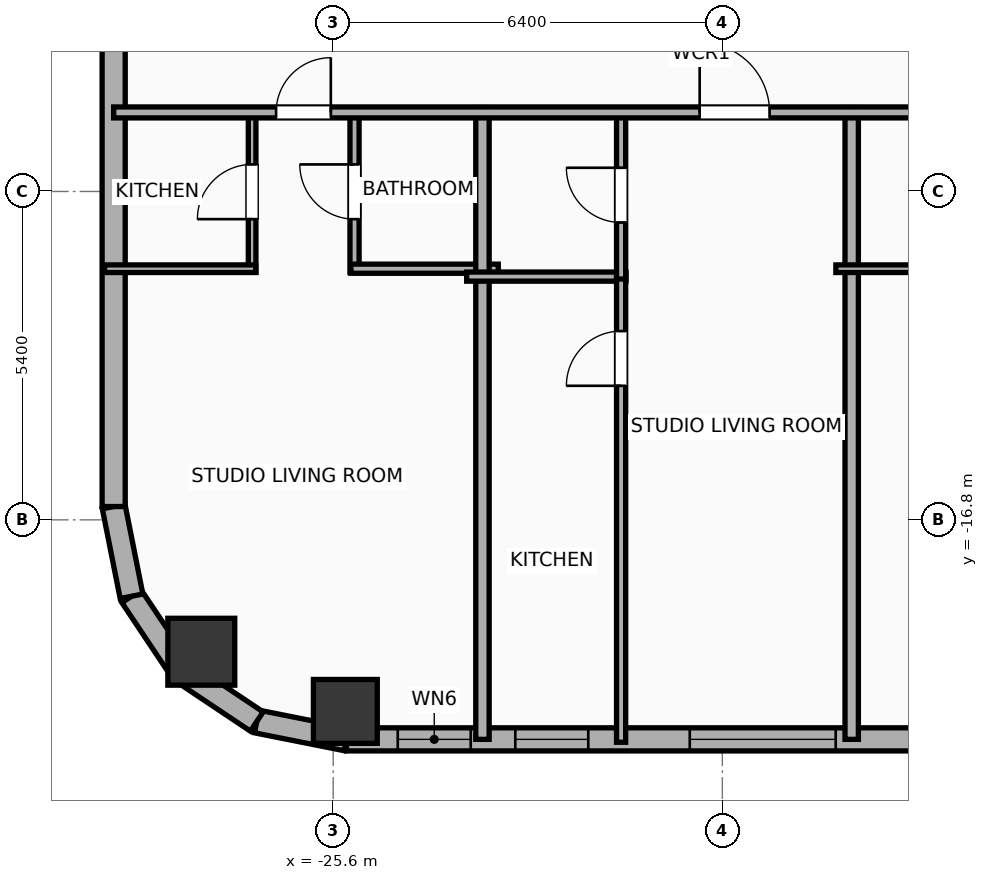
"""IFC4 building model, lengths in metres.
Left out: names, types, materials, properties, quantities, classifications, styles, units other than length and angle.
Written with IfcOpenShell. Run it as: python <this file> out.ifc"""

import sys

from ifc_helpers import new_model, si_unit, direction, frame, frame_2d, origin, origin_2d, place, context, subcontext, project, spatial, rectangle, hollow_rectangle, hollow_circle, extrude, element, fill, save


model = new_model("IFC4")
c1 = context("Model", 3, precision=1e-05, world=origin(), true_north=direction((0.0, 1.0)))
c2 = subcontext(c1, "Body", "Model", "MODEL_VIEW")
j1 = project(units=[si_unit("LENGTHUNIT", "METRE"), si_unit("PLANEANGLEUNIT", "RADIAN")], contexts=[c1])
p1 = place(None, origin())
s1 = spatial("IfcSite", under=j1, at=p1, CompositionType="ELEMENT")
p2 = place(p1, origin())
s2 = spatial("IfcBuilding", under=s1, at=p2, CompositionType="ELEMENT")
p3 = place(p2, frame((0.0, 0.0, 124.8)))
s3 = spatial("IfcBuildingStorey", under=s2, at=p3, CompositionType="ELEMENT", Elevation=124.8)
p4 = place(p3, frame((-25.4, -19.95, 0.0), z_axis=(0.0, 0.0, 1.0), x_axis=(1.0, 0.0, 0.0)))
e1 = element("IfcColumn", 1, at=p4, inside=s3, PredefinedType="COLUMN", context=c2, shape_type="SweptSolid", body=[
    extrude(hollow_rectangle(XDim=1.05, YDim=1.05, WallThickness=0.036, at=origin_2d()), origin(), (0.0, 0.0, 1.0), 3.9),
])
p5 = place(p3, frame((-27.769, -18.969, 0.0), z_axis=(0.0, 0.0, 1.0), x_axis=(1.0, 0.0, 0.0)))
e2 = element("IfcColumn", 2, at=p5, inside=s3, PredefinedType="COLUMN", context=c2, shape_type="SweptSolid", body=[
    extrude(hollow_circle(Radius=0.55, WallThickness=0.036, at=origin_2d()), origin(), (0.0, 0.0, 1.0), 3.9),
])
p6 = place(p3, frame((29.381, -20.41, 0.0), z_axis=(0.0, 0.0, 1.0), x_axis=(-1.0, 0.0, 0.0)))
e3 = element("IfcWall", 3, at=p6, inside=s3, PredefinedType="ELEMENTEDWALL", context=c2, shape_type="SweptSolid", body=[
    extrude(rectangle(XDim=54.763, YDim=0.38, at=frame_2d((27.381, 0.0))), origin(), (0.0, 0.0, 1.0), 3.65),
])
p7 = place(p6, frame((5.645, 0.0, 0.75)))
e4 = element("IfcOpeningElement", 4, at=p7, cuts=e3, PredefinedType="OPENING", context=c2, shape_type="SweptSolid", body=[
    extrude(rectangle(XDim=2.4, YDim=2.1, at=frame_2d((1.2, 1.05))), frame((0.0, 0.2, 0.0), z_axis=(0.0, -1.0, 0.0), x_axis=(1.0, 0.0, 0.0)), (0.0, 0.0, 1.0), 0.4),
])
p8 = place(p6, frame((18.486, 0.0, 0.75)))
e5 = element("IfcOpeningElement", 5, at=p8, cuts=e3, PredefinedType="OPENING", context=c2, shape_type="SweptSolid", body=[
    extrude(rectangle(XDim=2.4, YDim=2.1, at=frame_2d((1.2, 1.05))), frame((0.0, 0.2, 0.0), z_axis=(0.0, -1.0, 0.0), x_axis=(1.0, 0.0, 0.0)), (0.0, 0.0, 1.0), 0.4),
])
p9 = place(p6, frame((34.677, 0.0, 0.75)))
e6 = element("IfcOpeningElement", 6, at=p9, cuts=e3, PredefinedType="OPENING", context=c2, shape_type="SweptSolid", body=[
    extrude(rectangle(XDim=2.4, YDim=2.1, at=frame_2d((1.2, 1.05))), frame((0.0, 0.2, 0.0), z_axis=(0.0, -1.0, 0.0), x_axis=(1.0, 0.0, 0.0)), (0.0, 0.0, 1.0), 0.4),
])
p10 = place(p6, frame((46.717, 0.0, 0.75)))
e7 = element("IfcOpeningElement", 7, at=p10, cuts=e3, PredefinedType="OPENING", context=c2, shape_type="SweptSolid", body=[
    extrude(rectangle(XDim=2.4, YDim=2.1, at=frame_2d((1.2, 1.05))), frame((0.0, 0.2, 0.0), z_axis=(0.0, -1.0, 0.0), x_axis=(1.0, 0.0, 0.0)), (0.0, 0.0, 1.0), 0.4),
])
p11 = place(p6, frame((52.719, 0.0, 0.75)))
e8 = element("IfcOpeningElement", 8, at=p11, cuts=e3, PredefinedType="OPENING", context=c2, shape_type="SweptSolid", body=[
    extrude(rectangle(XDim=1.2, YDim=2.05, at=frame_2d((0.6, 1.025))), frame((0.0, 0.2, 0.0), z_axis=(0.0, -1.0, 0.0), x_axis=(1.0, 0.0, 0.0)), (0.0, 0.0, 1.0), 0.4),
])
p12 = place(p6, frame((50.786, 0.0, 0.75)))
e9 = element("IfcOpeningElement", 9, at=p12, cuts=e3, PredefinedType="OPENING", context=c2, shape_type="SweptSolid", body=[
    extrude(rectangle(XDim=1.2, YDim=2.05, at=frame_2d((0.6, 1.025))), frame((0.0, 0.2, 0.0), z_axis=(0.0, -1.0, 0.0), x_axis=(1.0, 0.0, 0.0)), (0.0, 0.0, 1.0), 0.4),
])
p13 = place(p6, frame((41.858, 0.0, 0.75)))
e10 = element("IfcOpeningElement", 10, at=p13, cuts=e3, PredefinedType="OPENING", context=c2, shape_type="SweptSolid", body=[
    extrude(rectangle(XDim=1.2, YDim=2.05, at=frame_2d((0.6, 1.025))), frame((0.0, 0.2, 0.0), z_axis=(0.0, -1.0, 0.0), x_axis=(1.0, 0.0, 0.0)), (0.0, 0.0, 1.0), 0.4),
])
p14 = place(p6, frame((38.556, 0.0, 0.75)))
e11 = element("IfcOpeningElement", 11, at=p14, cuts=e3, PredefinedType="OPENING", context=c2, shape_type="SweptSolid", body=[
    extrude(rectangle(XDim=1.2, YDim=2.05, at=frame_2d((0.6, 1.025))), frame((0.0, 0.2, 0.0), z_axis=(0.0, -1.0, 0.0), x_axis=(1.0, 0.0, 0.0)), (0.0, 0.0, 1.0), 0.4),
])
p15 = place(p6, frame((30.406, 0.0, 0.75)))
e12 = element("IfcOpeningElement", 12, at=p15, cuts=e3, PredefinedType="OPENING", context=c2, shape_type="SweptSolid", body=[
    extrude(rectangle(XDim=1.2, YDim=2.05, at=frame_2d((0.6, 1.025))), frame((0.0, 0.2, 0.0), z_axis=(0.0, -1.0, 0.0), x_axis=(1.0, 0.0, 0.0)), (0.0, 0.0, 1.0), 0.4),
])
p16 = place(p6, frame((25.434, 0.0, 0.75)))
e13 = element("IfcOpeningElement", 13, at=p16, cuts=e3, PredefinedType="OPENING", context=c2, shape_type="SweptSolid", body=[
    extrude(rectangle(XDim=1.2, YDim=2.05, at=frame_2d((0.6, 1.025))), frame((0.0, 0.2, 0.0), z_axis=(0.0, -1.0, 0.0), x_axis=(1.0, 0.0, 0.0)), (0.0, 0.0, 1.0), 0.4),
])
p17 = place(p6, frame((22.669, 0.0, 0.75)))
e14 = element("IfcOpeningElement", 14, at=p17, cuts=e3, PredefinedType="OPENING", context=c2, shape_type="SweptSolid", body=[
    extrude(rectangle(XDim=1.2, YDim=2.05, at=frame_2d((0.6, 1.025))), frame((0.0, 0.2, 0.0), z_axis=(0.0, -1.0, 0.0), x_axis=(1.0, 0.0, 0.0)), (0.0, 0.0, 1.0), 0.4),
])
p18 = place(p6, frame((15.954, 0.0, 0.75)))
e15 = element("IfcOpeningElement", 15, at=p18, cuts=e3, PredefinedType="OPENING", context=c2, shape_type="SweptSolid", body=[
    extrude(rectangle(XDim=1.2, YDim=2.05, at=frame_2d((0.6, 1.025))), frame((0.0, 0.2, 0.0), z_axis=(0.0, -1.0, 0.0), x_axis=(1.0, 0.0, 0.0)), (0.0, 0.0, 1.0), 0.4),
])
p19 = place(p6, frame((11.698, 0.0, 0.75)))
e16 = element("IfcOpeningElement", 16, at=p19, cuts=e3, PredefinedType="OPENING", context=c2, shape_type="SweptSolid", body=[
    extrude(rectangle(XDim=1.2, YDim=2.05, at=frame_2d((0.6, 1.025))), frame((0.0, 0.2, 0.0), z_axis=(0.0, -1.0, 0.0), x_axis=(1.0, 0.0, 0.0)), (0.0, 0.0, 1.0), 0.4),
])
p20 = place(p6, frame((3.225, 0.0, 0.75)))
e17 = element("IfcOpeningElement", 17, at=p20, cuts=e3, PredefinedType="OPENING", context=c2, shape_type="SweptSolid", body=[
    extrude(rectangle(XDim=1.2, YDim=2.05, at=frame_2d((0.6, 1.025))), frame((0.0, 0.2, 0.0), z_axis=(0.0, -1.0, 0.0), x_axis=(1.0, 0.0, 0.0)), (0.0, 0.0, 1.0), 0.4),
])
p21 = place(p6, frame((1.13, 0.0, 0.75)))
e18 = element("IfcOpeningElement", 18, at=p21, cuts=e3, PredefinedType="OPENING", context=c2, shape_type="SweptSolid", body=[
    extrude(rectangle(XDim=1.2, YDim=2.05, at=frame_2d((0.6, 1.025))), frame((0.0, 0.2, 0.0), z_axis=(0.0, -1.0, 0.0), x_axis=(1.0, 0.0, 0.0)), (0.0, 0.0, 1.0), 0.4),
])
p22 = place(p3, frame((-25.381, -20.41, 0.0), z_axis=(0.0, 0.0, 1.0), x_axis=(-0.980786132421, 0.195086038585, 0.0)))
e19 = element("IfcWall", 19, at=p22, inside=s3, PredefinedType="ELEMENTEDWALL", context=c2, shape_type="SweptSolid", body=[
    extrude(rectangle(XDim=1.504, YDim=0.38, at=frame_2d((0.752, 0.0))), origin(), (0.0, 0.0, 1.0), 3.65),
])
p23 = place(p3, frame((-26.857, -20.116, 0.0), z_axis=(0.0, 0.0, 1.0), x_axis=(-0.831468045563, 0.555572577804, 0.0)))
e20 = element("IfcWall", 20, at=p23, inside=s3, PredefinedType="ELEMENTEDWALL", context=c2, shape_type="SweptSolid", body=[
    extrude(rectangle(XDim=1.485, YDim=0.38, at=frame_2d((0.742, 0.0))), origin(), (0.0, 0.0, 1.0), 3.65),
])
p24 = place(p3, frame((-28.091, -19.292, 0.0), z_axis=(0.0, 0.0, 1.0), x_axis=(-0.555610286119, 0.831442848281, 0.0)))
e21 = element("IfcWall", 21, at=p24, inside=s3, PredefinedType="ELEMENTEDWALL", context=c2, shape_type="SweptSolid", body=[
    extrude(rectangle(XDim=1.485, YDim=0.38, at=frame_2d((0.743, 0.0))), origin(), (0.0, 0.0, 1.0), 3.65),
])
p25 = place(p3, frame((-28.917, -18.057, 0.0), z_axis=(0.0, 0.0, 1.0), x_axis=(-0.195086038585, 0.980786132421, 0.0)))
e22 = element("IfcWall", 22, at=p25, inside=s3, PredefinedType="ELEMENTEDWALL", context=c2, shape_type="SweptSolid", body=[
    extrude(rectangle(XDim=1.504, YDim=0.38, at=frame_2d((0.752, 0.0))), origin(), (0.0, 0.0, 1.0), 3.65),
])
p26 = place(p3, frame((-29.21, -16.581, 0.0), z_axis=(0.0, 0.0, 1.0), x_axis=(0.0, 1.0, 0.0)))
e23 = element("IfcWall", 23, at=p26, inside=s3, PredefinedType="ELEMENTEDWALL", context=c2, shape_type="SweptSolid", body=[
    extrude(rectangle(XDim=34.363, YDim=0.38, at=frame_2d((17.181, 0.0))), origin(), (0.0, 0.0, 1.0), 3.65),
])
p27 = place(p26, frame((30.757, 0.0, 0.75)))
e24 = element("IfcOpeningElement", 24, at=p27, cuts=e23, PredefinedType="OPENING", context=c2, shape_type="SweptSolid", body=[
    extrude(rectangle(XDim=1.2, YDim=2.05, at=frame_2d((0.6, 1.025))), frame((0.0, 0.2, 0.0), z_axis=(0.0, -1.0, 0.0), x_axis=(1.0, 0.0, 0.0)), (0.0, 0.0, 1.0), 0.4),
])
p28 = place(p26, frame((20.326, 0.0, 0.75)))
e25 = element("IfcOpeningElement", 25, at=p28, cuts=e23, PredefinedType="OPENING", context=c2, shape_type="SweptSolid", body=[
    extrude(rectangle(XDim=1.2, YDim=2.05, at=frame_2d((0.6, 1.025))), frame((0.0, 0.2, 0.0), z_axis=(0.0, -1.0, 0.0), x_axis=(1.0, 0.0, 0.0)), (0.0, 0.0, 1.0), 0.4),
])
p29 = place(p26, frame((11.776, 0.0, 0.75)))
e26 = element("IfcOpeningElement", 26, at=p29, cuts=e23, PredefinedType="OPENING", context=c2, shape_type="SweptSolid", body=[
    extrude(rectangle(XDim=1.2, YDim=2.05, at=frame_2d((0.6, 1.025))), frame((0.0, 0.2, 0.0), z_axis=(0.0, -1.0, 0.0), x_axis=(1.0, 0.0, 0.0)), (0.0, 0.0, 1.0), 0.4),
])
p30 = place(p3, frame((-26.933, -12.73, 0.0), z_axis=(0.0, 0.0, 1.0), x_axis=(0.0, 1.0, 0.0)))
e27 = element("IfcWall", 27, at=p30, inside=s3, PredefinedType="PARTITIONING", context=c2, shape_type="SweptSolid", body=[
    extrude(rectangle(XDim=2.65, YDim=0.125, at=frame_2d((1.325, 0.0))), origin(), (0.0, 0.0, 1.0), 3.65),
])
p31 = place(p30, frame((0.875, 0.0, 0.0)))
e28 = element("IfcOpeningElement", 28, at=p31, cuts=e27, PredefinedType="OPENING", context=c2, shape_type="SweptSolid", body=[
    extrude(rectangle(XDim=0.9, YDim=2.05, at=frame_2d((0.45, 1.025))), frame((0.0, 0.073, 0.0), z_axis=(0.0, -1.0, 0.0), x_axis=(1.0, 0.0, 0.0)), (0.0, 0.0, 1.0), 0.145),
])
p32 = place(p3, frame((-25.249, -12.73, 0.0), z_axis=(0.0, 0.0, 1.0), x_axis=(0.0, 1.0, 0.0)))
e29 = element("IfcWall", 29, at=p32, inside=s3, PredefinedType="PLUMBINGWALL", context=c2, shape_type="SweptSolid", body=[
    extrude(rectangle(XDim=2.65, YDim=0.15, at=frame_2d((1.325, 0.0))), origin(), (0.0, 0.0, 1.0), 3.65),
])
p33 = place(p32, frame((0.875, 0.0, 0.0)))
e30 = element("IfcOpeningElement", 30, at=p33, cuts=e29, PredefinedType="OPENING", context=c2, shape_type="SweptSolid", body=[
    extrude(rectangle(XDim=0.9, YDim=2.05, at=frame_2d((0.45, 1.025))), frame((0.0, 0.085, 0.0), z_axis=(0.0, -1.0, 0.0), x_axis=(1.0, 0.0, 0.0)), (0.0, 0.0, 1.0), 0.17),
])
p34 = place(p3, frame((-29.36, -12.67, 0.0), z_axis=(0.0, 0.0, 1.0), x_axis=(1.0, 0.0, 0.0)))
e31 = element("IfcWall", 31, at=p34, inside=s3, PredefinedType="PARTITIONING", context=c2, shape_type="SweptSolid", body=[
    extrude(rectangle(XDim=2.487, YDim=0.125, at=frame_2d((1.244, 0.0))), origin(), (0.0, 0.0, 1.0), 3.65),
])
p35 = place(p3, frame((-25.309, -12.67, 0.0), z_axis=(0.0, 0.0, 1.0), x_axis=(1.0, 0.0, 0.0)))
e32 = element("IfcWall", 32, at=p35, inside=s3, PredefinedType="PLUMBINGWALL", context=c2, shape_type="SweptSolid", body=[
    extrude(rectangle(XDim=2.424, YDim=0.15, at=frame_2d((1.212, 0.0))), origin(), (0.0, 0.0, 1.0), 3.65),
])
p36 = place(p3, frame((-23.145, -20.41, 0.0), z_axis=(0.0, 0.0, 1.0), x_axis=(0.0, 1.0, 0.0)))
e33 = element("IfcWall", 33, at=p36, inside=s3, PredefinedType="PARTITIONING", context=c2, shape_type="SweptSolid", body=[
    extrude(rectangle(XDim=10.39, YDim=0.22, at=frame_2d((5.195, 0.0))), origin(), (0.0, 0.0, 1.0), 3.65),
])
p37 = place(p3, frame((-23.405, -12.8, 0.0), z_axis=(0.0, 0.0, 1.0), x_axis=(1.0, 0.0, 0.0)))
e34 = element("IfcWall", 34, at=p37, inside=s3, PredefinedType="PLUMBINGWALL", context=c2, shape_type="SweptSolid", body=[
    extrude(rectangle(XDim=2.62, YDim=0.15, at=frame_2d((1.31, 0.0))), origin(), (0.0, 0.0, 1.0), 3.65),
])
p38 = place(p3, frame((-20.865, -20.458, 0.0), z_axis=(0.0, 0.0, 1.0), x_axis=(0.0, 1.0, 0.0)))
e35 = element("IfcWall", 35, at=p38, inside=s3, PredefinedType="PLUMBINGWALL", context=c2, shape_type="SweptSolid", body=[
    extrude(rectangle(XDim=7.698, YDim=0.15, at=frame_2d((3.849, 0.0))), origin(), (0.0, 0.0, 1.0), 3.65),
])
p39 = place(p38, frame((5.862, 0.0, 0.0)))
e36 = element("IfcOpeningElement", 36, at=p39, cuts=e35, PredefinedType="OPENING", context=c2, shape_type="SweptSolid", body=[
    extrude(rectangle(XDim=0.9, YDim=2.05, at=frame_2d((0.45, 1.025))), frame((0.0, 0.085, 0.0), z_axis=(0.0, -1.0, 0.0), x_axis=(1.0, 0.0, 0.0)), (0.0, 0.0, 1.0), 0.17),
])
p40 = place(p3, frame((-20.865, -12.84, 0.0), z_axis=(0.0, 0.0, 1.0), x_axis=(0.0, 1.0, 0.0)))
e37 = element("IfcWall", 37, at=p40, inside=s3, PredefinedType="PLUMBINGWALL", context=c2, shape_type="SweptSolid", body=[
    extrude(rectangle(XDim=2.76, YDim=0.15, at=frame_2d((1.38, 0.0))), origin(), (0.0, 0.0, 1.0), 3.65),
])
p41 = place(p40, frame((0.93, 0.0, 0.0)))
e38 = element("IfcOpeningElement", 38, at=p41, cuts=e37, PredefinedType="OPENING", context=c2, shape_type="SweptSolid", body=[
    extrude(rectangle(XDim=0.9, YDim=2.05, at=frame_2d((0.45, 1.025))), frame((0.0, 0.085, 0.0), z_axis=(0.0, -1.0, 0.0), x_axis=(1.0, 0.0, 0.0)), (0.0, 0.0, 1.0), 0.17),
])
p42 = place(p3, frame((-17.073, -20.41, 0.0), z_axis=(0.0, 0.0, 1.0), x_axis=(0.0, 1.0, 0.0)))
e39 = element("IfcWall", 39, at=p42, inside=s3, PredefinedType="PARTITIONING", context=c2, shape_type="SweptSolid", body=[
    extrude(rectangle(XDim=10.39, YDim=0.22, at=frame_2d((5.195, 0.0))), origin(), (0.0, 0.0, 1.0), 3.65),
])
p43 = place(p3, frame((-17.333, -12.67, 0.0), z_axis=(0.0, 0.0, 1.0), x_axis=(1.0, 0.0, 0.0)))
e40 = element("IfcWall", 40, at=p43, inside=s3, PredefinedType="PARTITIONING", context=c2, shape_type="SweptSolid", body=[
    extrude(rectangle(XDim=2.642, YDim=0.125, at=frame_2d((1.321, 0.0))), origin(), (0.0, 0.0, 1.0), 3.65),
])
p44 = place(p3, frame((-29.21, -10.1, 0.0), z_axis=(0.0, 0.0, 1.0), x_axis=(1.0, 0.0, 0.0)))
e41 = element("IfcWall", 41, at=p44, inside=s3, PredefinedType="PARTITIONING", context=c2, shape_type="SweptSolid", body=[
    extrude(rectangle(XDim=62.42, YDim=0.18, at=frame_2d((31.21, 0.0))), origin(), (0.0, 0.0, 1.0), 3.65),
])
p45 = place(p44, frame((2.671, 0.0, 0.0)))
e42 = element("IfcOpeningElement", 42, at=p45, cuts=e41, PredefinedType="OPENING", context=c2, shape_type="SweptSolid", body=[
    extrude(rectangle(XDim=0.9, YDim=2.05, at=frame_2d((0.45, 1.025))), frame((0.0, 0.1, 0.0), z_axis=(0.0, -1.0, 0.0), x_axis=(1.0, 0.0, 0.0)), (0.0, 0.0, 1.0), 0.2),
])
p46 = place(p44, frame((9.637, 0.0, 0.0)))
e43 = element("IfcOpeningElement", 43, at=p46, cuts=e41, PredefinedType="OPENING", context=c2, shape_type="SweptSolid", body=[
    extrude(rectangle(XDim=1.15, YDim=2.05, at=frame_2d((0.575, 1.025))), frame((0.0, 0.1, 0.0), z_axis=(0.0, -1.0, 0.0), x_axis=(1.0, 0.0, 0.0)), (0.0, 0.0, 1.0), 0.2),
])
p47 = place(p44, frame((14.843, 0.0, 0.0)))
e44 = element("IfcOpeningElement", 44, at=p47, cuts=e41, PredefinedType="OPENING", context=c2, shape_type="SweptSolid", body=[
    extrude(rectangle(XDim=0.9, YDim=2.05, at=frame_2d((0.45, 1.025))), frame((0.0, 0.1, 0.0), z_axis=(0.0, -1.0, 0.0), x_axis=(1.0, 0.0, 0.0)), (0.0, 0.0, 1.0), 0.2),
])
p48 = place(p44, frame((21.958, 0.0, 0.0)))
e45 = element("IfcOpeningElement", 45, at=p48, cuts=e41, PredefinedType="OPENING", context=c2, shape_type="SweptSolid", body=[
    extrude(rectangle(XDim=1.15, YDim=2.05, at=frame_2d((0.575, 1.025))), frame((0.0, 0.1, 0.0), z_axis=(0.0, -1.0, 0.0), x_axis=(1.0, 0.0, 0.0)), (0.0, 0.0, 1.0), 0.2),
])
p49 = place(p44, frame((27.258, 0.0, 0.0)))
e46 = element("IfcOpeningElement", 46, at=p49, cuts=e41, PredefinedType="OPENING", context=c2, shape_type="SweptSolid", body=[
    extrude(rectangle(XDim=0.9, YDim=2.05, at=frame_2d((0.45, 1.025))), frame((0.0, 0.1, 0.0), z_axis=(0.0, -1.0, 0.0), x_axis=(1.0, 0.0, 0.0)), (0.0, 0.0, 1.0), 0.2),
])
p50 = place(p44, frame((32.014, 0.0, 0.0)))
e47 = element("IfcOpeningElement", 47, at=p50, cuts=e41, PredefinedType="OPENING", context=c2, shape_type="SweptSolid", body=[
    extrude(rectangle(XDim=1.15, YDim=2.05, at=frame_2d((0.575, 1.025))), frame((0.0, 0.1, 0.0), z_axis=(0.0, -1.0, 0.0), x_axis=(1.0, 0.0, 0.0)), (0.0, 0.0, 1.0), 0.2),
])
p51 = place(p44, frame((38.369, 0.0, 0.0)))
e48 = element("IfcOpeningElement", 48, at=p51, cuts=e41, PredefinedType="OPENING", context=c2, shape_type="SweptSolid", body=[
    extrude(rectangle(XDim=1.15, YDim=2.05, at=frame_2d((0.575, 1.025))), frame((0.0, 0.1, 0.0), z_axis=(0.0, -1.0, 0.0), x_axis=(1.0, 0.0, 0.0)), (0.0, 0.0, 1.0), 0.2),
])
p52 = place(p44, frame((46.09, 0.0, 0.0)))
e49 = element("IfcOpeningElement", 49, at=p52, cuts=e41, PredefinedType="OPENING", context=c2, shape_type="SweptSolid", body=[
    extrude(rectangle(XDim=0.9, YDim=2.05, at=frame_2d((0.45, 1.025))), frame((0.0, 0.1, 0.0), z_axis=(0.0, -1.0, 0.0), x_axis=(1.0, 0.0, 0.0)), (0.0, 0.0, 1.0), 0.2),
])
p53 = place(p44, frame((51.015, 0.0, 0.0)))
e50 = element("IfcOpeningElement", 50, at=p53, cuts=e41, PredefinedType="OPENING", context=c2, shape_type="SweptSolid", body=[
    extrude(rectangle(XDim=1.15, YDim=2.05, at=frame_2d((0.575, 1.025))), frame((0.0, 0.1, 0.0), z_axis=(0.0, -1.0, 0.0), x_axis=(1.0, 0.0, 0.0)), (0.0, 0.0, 1.0), 0.2),
])
p54 = place(p44, frame((58.93, 0.0, 0.0)))
e51 = element("IfcOpeningElement", 51, at=p54, cuts=e41, PredefinedType="OPENING", context=c2, shape_type="SweptSolid", body=[
    extrude(rectangle(XDim=0.9, YDim=2.05, at=frame_2d((0.45, 1.025))), frame((0.0, 0.1, 0.0), z_axis=(0.0, -1.0, 0.0), x_axis=(1.0, 0.0, 0.0)), (0.0, 0.0, 1.0), 0.2),
])
p55 = place(p10, origin())
e52 = element("IfcWindow", 52, at=p55, inside=s3, PartitioningType="SINGLE_PANEL", PredefinedType="WINDOW", context=c2, shape_type="SweptSolid", body=[
    extrude(rectangle(XDim=2.4, YDim=2.1, at=frame_2d((1.2, 1.05))), frame((0.0, 0.03, 0.0), z_axis=(0.0, -1.0, 0.0), x_axis=(1.0, 0.0, 0.0)), (0.0, 0.0, 1.0), 0.06),
])
fill(e7, e52)
p56 = place(p11, origin())
e53 = element("IfcWindow", 53, at=p56, inside=s3, PartitioningType="SINGLE_PANEL", PredefinedType="WINDOW", context=c2, shape_type="SweptSolid", body=[
    extrude(rectangle(XDim=1.2, YDim=2.05, at=frame_2d((0.6, 1.025))), frame((0.0, 0.03, 0.0), z_axis=(0.0, -1.0, 0.0), x_axis=(1.0, 0.0, 0.0)), (0.0, 0.0, 1.0), 0.06),
])
fill(e8, e53)
p57 = place(p12, origin())
e54 = element("IfcWindow", 54, at=p57, inside=s3, PartitioningType="SINGLE_PANEL", PredefinedType="WINDOW", context=c2, shape_type="SweptSolid", body=[
    extrude(rectangle(XDim=1.2, YDim=2.05, at=frame_2d((0.6, 1.025))), frame((0.0, 0.03, 0.0), z_axis=(0.0, -1.0, 0.0), x_axis=(1.0, 0.0, 0.0)), (0.0, 0.0, 1.0), 0.06),
])
fill(e9, e54)
p58 = place(p31, origin())
e55 = element("IfcDoor", 55, at=p58, inside=s3, OperationType="SINGLE_SWING_LEFT", PredefinedType="DOOR", context=c2, shape_type="SweptSolid", body=[
    extrude(rectangle(XDim=0.9, YDim=2.05, at=frame_2d((0.45, 1.025))), frame((0.0, 0.025, 0.0), z_axis=(0.0, -1.0, 0.0), x_axis=(1.0, 0.0, 0.0)), (0.0, 0.0, 1.0), 0.05),
])
fill(e28, e55)
p59 = place(p33, origin())
e56 = element("IfcDoor", 56, at=p59, inside=s3, OperationType="SINGLE_SWING_RIGHT", PredefinedType="DOOR", context=c2, shape_type="SweptSolid", body=[
    extrude(rectangle(XDim=0.9, YDim=2.05, at=frame_2d((0.45, 1.025))), frame((0.0, 0.025, 0.0), z_axis=(0.0, -1.0, 0.0), x_axis=(1.0, 0.0, 0.0)), (0.0, 0.0, 1.0), 0.05),
])
fill(e30, e56)
p60 = place(p39, origin())
e57 = element("IfcDoor", 57, at=p60, inside=s3, OperationType="SINGLE_SWING_LEFT", PredefinedType="DOOR", context=c2, shape_type="SweptSolid", body=[
    extrude(rectangle(XDim=0.9, YDim=2.05, at=frame_2d((0.45, 1.025))), frame((0.0, 0.025, 0.0), z_axis=(0.0, -1.0, 0.0), x_axis=(1.0, 0.0, 0.0)), (0.0, 0.0, 1.0), 0.05),
])
fill(e36, e57)
p61 = place(p41, origin())
e58 = element("IfcDoor", 58, at=p61, inside=s3, OperationType="SINGLE_SWING_RIGHT", PredefinedType="DOOR", context=c2, shape_type="SweptSolid", body=[
    extrude(rectangle(XDim=0.9, YDim=2.05, at=frame_2d((0.45, 1.025))), frame((0.0, 0.025, 0.0), z_axis=(0.0, -1.0, 0.0), x_axis=(1.0, 0.0, 0.0)), (0.0, 0.0, 1.0), 0.05),
])
fill(e38, e58)
p62 = place(p45, origin())
e59 = element("IfcDoor", 59, at=p62, inside=s3, OperationType="SINGLE_SWING_RIGHT", PredefinedType="DOOR", context=c2, shape_type="SweptSolid", body=[
    extrude(rectangle(XDim=0.9, YDim=2.05, at=frame_2d((0.45, 1.025))), frame((0.0, 0.025, 0.0), z_axis=(0.0, -1.0, 0.0), x_axis=(1.0, 0.0, 0.0)), (0.0, 0.0, 1.0), 0.05),
])
fill(e42, e59)
p63 = place(p46, origin())
e60 = element("IfcDoor", 60, at=p63, inside=s3, OperationType="SINGLE_SWING_LEFT", PredefinedType="DOOR", context=c2, shape_type="SweptSolid", body=[
    extrude(rectangle(XDim=1.15, YDim=2.05, at=frame_2d((0.575, 1.025))), frame((0.0, 0.025, 0.0), z_axis=(0.0, -1.0, 0.0), x_axis=(1.0, 0.0, 0.0)), (0.0, 0.0, 1.0), 0.05),
])
fill(e43, e60)
save(model, sys.argv[1])
